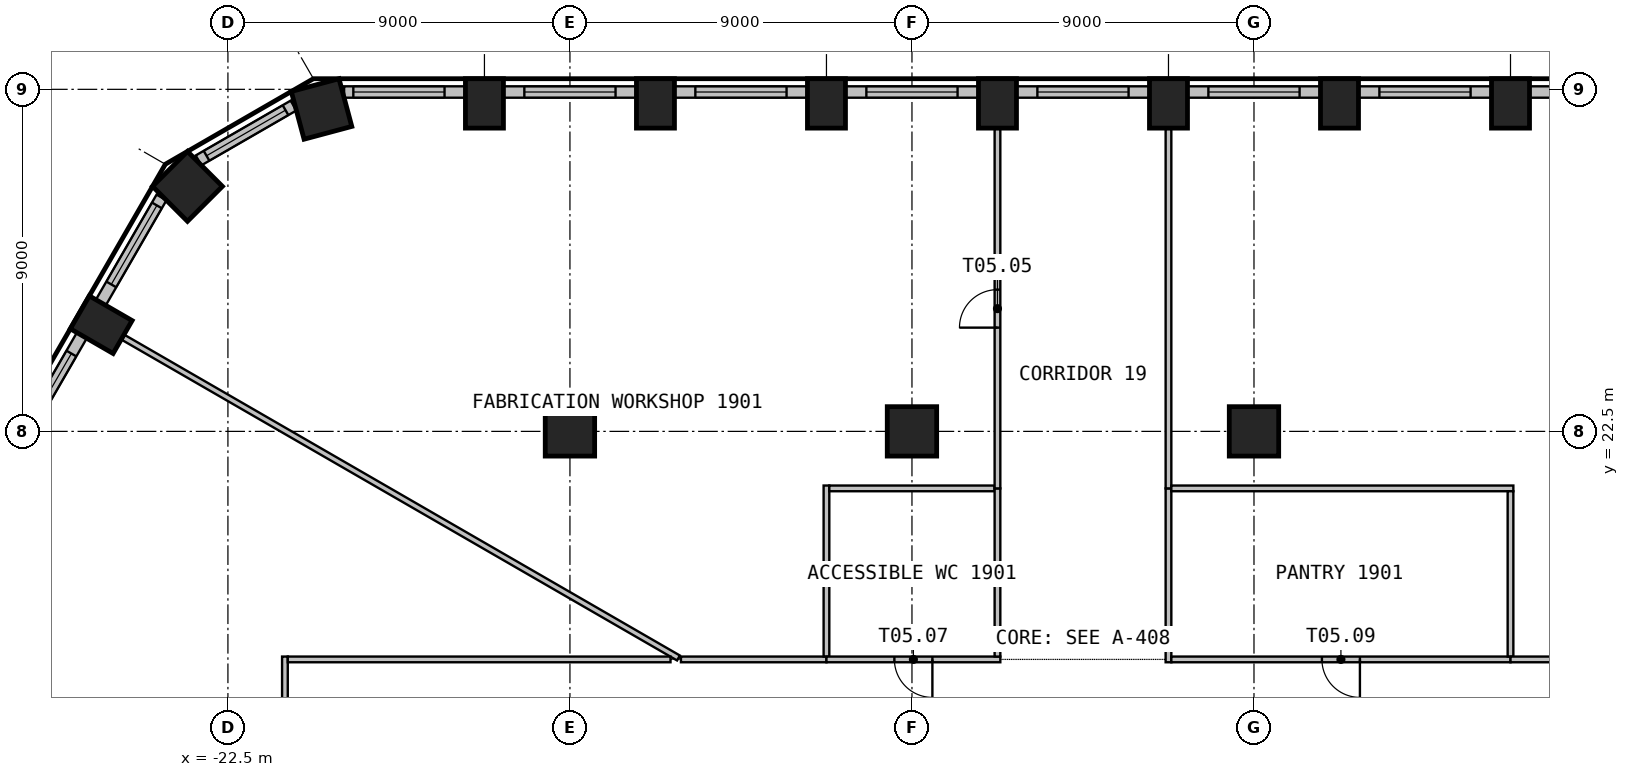
"""IFC4 building model, lengths in metres.
Left out: names, types, materials, properties, quantities, classifications, styles, units other than length and angle.
Written with IfcOpenShell. Run it as: python <this file> out.ifc"""

import sys

from ifc_helpers import new_model, si_unit, direction, frame, frame_2d, origin, origin_2d, place, context, subcontext, project, spatial, rectangle, circle, extrude, element, fill, save


model = new_model("IFC4")
c1 = context("Model", 3, precision=1e-05, world=origin(), true_north=direction((0.0, 1.0)))
c2 = subcontext(c1, "Body", "Model", "MODEL_VIEW")
j1 = project(units=[si_unit("LENGTHUNIT", "METRE"), si_unit("PLANEANGLEUNIT", "RADIAN")], contexts=[c1])
p1 = place(None, origin())
s1 = spatial("IfcSite", under=j1, at=p1, CompositionType="ELEMENT")
p2 = place(p1, origin())
s2 = spatial("IfcBuilding", under=s1, at=p2, CompositionType="ELEMENT")
p3 = place(p2, frame((0.0, 0.0, 81.3)))
s3 = spatial("IfcBuildingStorey", under=s2, at=p3, CompositionType="ELEMENT", Elevation=81.3)
for number, where, z_axis, x_axis in (
    (1, (11.25, 31.13, 0.0), (0.0, 0.0, 1.0), (-1.0, 0.0, 0.0)),
    (2, (6.75, 31.13, 0.0), (0.0, 0.0, 1.0), (-1.0, 0.0, 0.0)),
    (3, (2.25, 31.13, 0.0), (0.0, 0.0, 1.0), (-1.0, 0.0, 0.0)),
    (4, (-2.25, 31.13, 0.0), (0.0, 0.0, 1.0), (-1.0, 0.0, 0.0)),
    (5, (-6.75, 31.13, 0.0), (0.0, 0.0, 1.0), (-1.0, 0.0, 0.0)),
    (6, (-11.25, 31.13, 0.0), (0.0, 0.0, 1.0), (-1.0, 0.0, 0.0)),
    (7, (-15.75, 31.13, 0.0), (0.0, 0.0, 1.0), (-1.0, 0.0, 0.0)),
):
    element("IfcColumn", number, at=place(p3, frame(where, z_axis=z_axis, x_axis=x_axis)), inside=s3, PredefinedType="COLUMN", context=c2, shape_type="SweptSolid", body=[
        extrude(rectangle(XDim=1.0, YDim=1.3, at=origin_2d()), origin(), (0.0, 0.0, 1.0), 3.525),
    ])
for number, where, z_axis, x_axis in (
    (8, (-20.037, 30.984, 0.0), (0.0, 0.0, 1.0), (-0.966, -0.259, 0.0)),
    (9, (-23.564, 28.947, 0.0), (0.0, 0.0, 1.0), (-0.707, -0.707, 0.0)),
):
    element("IfcColumn", number, at=place(p3, frame(where, z_axis=z_axis, x_axis=x_axis)), inside=s3, PredefinedType="COLUMN", context=c2, shape_type="SweptSolid", body=[
        extrude(rectangle(XDim=1.3, YDim=1.3, at=origin_2d()), origin(), (0.0, 0.0, 1.0), 3.525),
    ])
p4 = place(p3, frame((-25.834, 25.308, 0.0), z_axis=(0.0, 0.0, 1.0), x_axis=(-0.5, -0.866025403784, 0.0)))
e10 = element("IfcColumn", 10, at=p4, inside=s3, PredefinedType="COLUMN", context=c2, shape_type="SweptSolid", body=[
    extrude(rectangle(XDim=1.0, YDim=1.3, at=origin_2d()), origin(), (0.0, 0.0, 1.0), 3.525),
])
for number, where, z_axis, x_axis in (
    (11, (-13.5, 22.5, 0.0), (0.0, 0.0, 1.0), (1.0, 0.0, 0.0)),
    (12, (-4.5, 22.5, 0.0), (0.0, 0.0, 1.0), (1.0, 0.0, 0.0)),
    (13, (4.5, 22.5, 0.0), (0.0, 0.0, 1.0), (1.0, 0.0, 0.0)),
):
    element("IfcColumn", number, at=place(p3, frame(where, z_axis=z_axis, x_axis=x_axis)), inside=s3, PredefinedType="COLUMN", context=c2, shape_type="SweptSolid", body=[
        extrude(circle(Radius=0.65, at=origin_2d()), origin(), (0.0, 0.0, 1.0), 3.525),
    ])
p5 = place(p3, frame((15.25, 31.43, 0.0), z_axis=(0.0, 0.0, 1.0), x_axis=(-1.0, 0.0, 0.0)))
e14 = element("IfcWall", 14, at=p5, inside=s3, PredefinedType="SOLIDWALL", context=c2, shape_type="SweptSolid", body=[
    extrude(rectangle(XDim=3.499, YDim=0.3, at=frame_2d((1.75, 0.0))), origin(), (0.0, 0.0, 1.0), 3.525),
])
p6 = place(p5, frame((0.55, 0.0, 0.9)))
e15 = element("IfcOpeningElement", 15, at=p6, cuts=e14, PredefinedType="OPENING", context=c2, shape_type="SweptSolid", body=[
    extrude(rectangle(XDim=2.4, YDim=2.1, at=frame_2d((1.2, 1.05))), frame((0.0, 0.16, 0.0), z_axis=(0.0, -1.0, 0.0), x_axis=(1.0, 0.0, 0.0)), (0.0, 0.0, 1.0), 0.32),
])
p7 = place(p3, frame((10.75, 31.43, 0.0), z_axis=(0.0, 0.0, 1.0), x_axis=(-1.0, 0.0, 0.0)))
e16 = element("IfcWall", 16, at=p7, inside=s3, PredefinedType="SOLIDWALL", context=c2, shape_type="SweptSolid", body=[
    extrude(rectangle(XDim=3.499, YDim=0.3, at=frame_2d((1.75, 0.0))), origin(), (0.0, 0.0, 1.0), 3.525),
])
p8 = place(p7, frame((0.55, 0.0, 0.9)))
e17 = element("IfcOpeningElement", 17, at=p8, cuts=e16, PredefinedType="OPENING", context=c2, shape_type="SweptSolid", body=[
    extrude(rectangle(XDim=2.4, YDim=2.1, at=frame_2d((1.2, 1.05))), frame((0.0, 0.16, 0.0), z_axis=(0.0, -1.0, 0.0), x_axis=(1.0, 0.0, 0.0)), (0.0, 0.0, 1.0), 0.32),
])
p9 = place(p3, frame((6.25, 31.43, 0.0), z_axis=(0.0, 0.0, 1.0), x_axis=(-1.0, 0.0, 0.0)))
e18 = element("IfcWall", 18, at=p9, inside=s3, PredefinedType="SOLIDWALL", context=c2, shape_type="SweptSolid", body=[
    extrude(rectangle(XDim=3.499, YDim=0.3, at=frame_2d((1.75, 0.0))), origin(), (0.0, 0.0, 1.0), 3.525),
])
p10 = place(p9, frame((0.55, 0.0, 0.9)))
e19 = element("IfcOpeningElement", 19, at=p10, cuts=e18, PredefinedType="OPENING", context=c2, shape_type="SweptSolid", body=[
    extrude(rectangle(XDim=2.4, YDim=2.1, at=frame_2d((1.2, 1.05))), frame((0.0, 0.16, 0.0), z_axis=(0.0, -1.0, 0.0), x_axis=(1.0, 0.0, 0.0)), (0.0, 0.0, 1.0), 0.32),
])
p11 = place(p3, frame((1.75, 31.43, 0.0), z_axis=(0.0, 0.0, 1.0), x_axis=(-1.0, 0.0, 0.0)))
e20 = element("IfcWall", 20, at=p11, inside=s3, PredefinedType="SOLIDWALL", context=c2, shape_type="SweptSolid", body=[
    extrude(rectangle(XDim=3.499, YDim=0.3, at=frame_2d((1.75, 0.0))), origin(), (0.0, 0.0, 1.0), 3.525),
])
p12 = place(p11, frame((0.55, 0.0, 0.9)))
e21 = element("IfcOpeningElement", 21, at=p12, cuts=e20, PredefinedType="OPENING", context=c2, shape_type="SweptSolid", body=[
    extrude(rectangle(XDim=2.4, YDim=2.1, at=frame_2d((1.2, 1.05))), frame((0.0, 0.16, 0.0), z_axis=(0.0, -1.0, 0.0), x_axis=(1.0, 0.0, 0.0)), (0.0, 0.0, 1.0), 0.32),
])
p13 = place(p3, frame((-2.75, 31.43, 0.0), z_axis=(0.0, 0.0, 1.0), x_axis=(-1.0, 0.0, 0.0)))
e22 = element("IfcWall", 22, at=p13, inside=s3, PredefinedType="SOLIDWALL", context=c2, shape_type="SweptSolid", body=[
    extrude(rectangle(XDim=3.499, YDim=0.3, at=frame_2d((1.75, 0.0))), origin(), (0.0, 0.0, 1.0), 3.525),
])
p14 = place(p13, frame((0.55, 0.0, 0.9)))
e23 = element("IfcOpeningElement", 23, at=p14, cuts=e22, PredefinedType="OPENING", context=c2, shape_type="SweptSolid", body=[
    extrude(rectangle(XDim=2.4, YDim=2.1, at=frame_2d((1.2, 1.05))), frame((0.0, 0.16, 0.0), z_axis=(0.0, -1.0, 0.0), x_axis=(1.0, 0.0, 0.0)), (0.0, 0.0, 1.0), 0.32),
])
p15 = place(p3, frame((-7.25, 31.43, 0.0), z_axis=(0.0, 0.0, 1.0), x_axis=(-1.0, 0.0, 0.0)))
e24 = element("IfcWall", 24, at=p15, inside=s3, PredefinedType="SOLIDWALL", context=c2, shape_type="SweptSolid", body=[
    extrude(rectangle(XDim=3.499, YDim=0.3, at=frame_2d((1.75, 0.0))), origin(), (0.0, 0.0, 1.0), 3.525),
])
p16 = place(p15, frame((0.55, 0.0, 0.9)))
e25 = element("IfcOpeningElement", 25, at=p16, cuts=e24, PredefinedType="OPENING", context=c2, shape_type="SweptSolid", body=[
    extrude(rectangle(XDim=2.4, YDim=2.1, at=frame_2d((1.2, 1.05))), frame((0.0, 0.16, 0.0), z_axis=(0.0, -1.0, 0.0), x_axis=(1.0, 0.0, 0.0)), (0.0, 0.0, 1.0), 0.32),
])
p17 = place(p3, frame((-11.75, 31.43, 0.0), z_axis=(0.0, 0.0, 1.0), x_axis=(-1.0, 0.0, 0.0)))
e26 = element("IfcWall", 26, at=p17, inside=s3, PredefinedType="SOLIDWALL", context=c2, shape_type="SweptSolid", body=[
    extrude(rectangle(XDim=3.499, YDim=0.3, at=frame_2d((1.75, 0.0))), origin(), (0.0, 0.0, 1.0), 3.525),
])
p18 = place(p17, frame((0.55, 0.0, 0.9)))
e27 = element("IfcOpeningElement", 27, at=p18, cuts=e26, PredefinedType="OPENING", context=c2, shape_type="SweptSolid", body=[
    extrude(rectangle(XDim=2.4, YDim=2.1, at=frame_2d((1.2, 1.05))), frame((0.0, 0.16, 0.0), z_axis=(0.0, -1.0, 0.0), x_axis=(1.0, 0.0, 0.0)), (0.0, 0.0, 1.0), 0.32),
])
p19 = place(p3, frame((-16.25, 31.43, 0.0), z_axis=(0.0, 0.0, 1.0), x_axis=(-1.0, 0.0, 0.0)))
e28 = element("IfcWall", 28, at=p19, inside=s3, PredefinedType="SOLIDWALL", context=c2, shape_type="SweptSolid", body=[
    extrude(rectangle(XDim=3.192, YDim=0.3, at=frame_2d((1.596, 0.0))), origin(), (0.0, 0.0, 1.0), 3.525),
])
p20 = place(p19, frame((0.55, 0.0, 0.9)))
e29 = element("IfcOpeningElement", 29, at=p20, cuts=e28, PredefinedType="OPENING", context=c2, shape_type="SweptSolid", body=[
    extrude(rectangle(XDim=2.4, YDim=2.1, at=frame_2d((1.2, 1.05))), frame((0.0, 0.16, 0.0), z_axis=(0.0, -1.0, 0.0), x_axis=(1.0, 0.0, 0.0)), (0.0, 0.0, 1.0), 0.32),
])
p21 = place(p3, frame((-20.774, 31.073, 0.0), z_axis=(0.0, 0.0, 1.0), x_axis=(-0.866053149362, -0.49995194017, 0.0)))
e30 = element("IfcWall", 30, at=p21, inside=s3, PredefinedType="SOLIDWALL", context=c2, shape_type="SweptSolid", body=[
    extrude(rectangle(XDim=2.885, YDim=0.3, at=frame_2d((1.443, 0.0))), origin(), (0.0, 0.0, 1.0), 3.525),
])
p22 = place(p21, frame((0.243, 0.0, 0.9)))
e31 = element("IfcOpeningElement", 31, at=p22, cuts=e30, PredefinedType="OPENING", context=c2, shape_type="SweptSolid", body=[
    extrude(rectangle(XDim=2.4, YDim=2.1, at=frame_2d((1.2, 1.05))), frame((0.0, 0.16, 0.0), z_axis=(0.0, -1.0, 0.0), x_axis=(1.0, 0.0, 0.0)), (0.0, 0.0, 1.0), 0.32),
])
p23 = place(p3, frame((-24.248, 28.656, 0.0), z_axis=(0.0, 0.0, 1.0), x_axis=(-0.500004907028, -0.866022570692, 0.0)))
e32 = element("IfcWall", 32, at=p23, inside=s3, PredefinedType="SOLIDWALL", context=c2, shape_type="SweptSolid", body=[
    extrude(rectangle(XDim=3.192, YDim=0.3, at=frame_2d((1.596, 0.0))), origin(), (0.0, 0.0, 1.0), 3.525),
])
p24 = place(p23, frame((0.243, 0.0, 0.9)))
e33 = element("IfcOpeningElement", 33, at=p24, cuts=e32, PredefinedType="OPENING", context=c2, shape_type="SweptSolid", body=[
    extrude(rectangle(XDim=2.4, YDim=2.1, at=frame_2d((1.2, 1.05))), frame((0.0, 0.16, 0.0), z_axis=(0.0, -1.0, 0.0), x_axis=(1.0, 0.0, 0.0)), (0.0, 0.0, 1.0), 0.32),
])
p25 = place(p3, frame((-26.344, 25.024, 0.0), z_axis=(0.0, 0.0, 1.0), x_axis=(-0.499996256241, -0.866027565234, 0.0)))
e34 = element("IfcWall", 34, at=p25, inside=s3, PredefinedType="SOLIDWALL", context=c2, shape_type="SweptSolid", body=[
    extrude(rectangle(XDim=3.499, YDim=0.3, at=frame_2d((1.75, 0.0))), origin(), (0.0, 0.0, 1.0), 3.525),
])
p26 = place(p25, frame((0.55, 0.0, 0.9)))
e35 = element("IfcOpeningElement", 35, at=p26, cuts=e34, PredefinedType="OPENING", context=c2, shape_type="SweptSolid", body=[
    extrude(rectangle(XDim=2.4, YDim=2.1, at=frame_2d((1.2, 1.05))), frame((0.0, 0.16, 0.0), z_axis=(0.0, -1.0, 0.0), x_axis=(1.0, 0.0, 0.0)), (0.0, 0.0, 1.0), 0.32),
])
p27 = place(p3, frame((-25.254, 24.973, 0.0), z_axis=(0.0, 0.0, 1.0), x_axis=(0.866017851419, -0.500013080853, 0.0)))
e36 = element("IfcWall", 36, at=p27, inside=s3, PredefinedType="PARTITIONING", context=c2, shape_type="SweptSolid", body=[
    extrude(rectangle(XDim=16.87, YDim=0.15, at=frame_2d((8.435, 0.0))), origin(), (0.0, 0.0, 1.0), 3.525),
])
p28 = place(p3, frame((-21.0, 16.575, 0.0), z_axis=(0.0, 0.0, 1.0), x_axis=(0.0, -1.0, 0.0)))
e37 = element("IfcWall", 37, at=p28, inside=s3, PredefinedType="PARTITIONING", context=c2, shape_type="SweptSolid", body=[
    extrude(rectangle(XDim=13.762, YDim=0.15, at=frame_2d((6.881, 0.0))), origin(), (0.0, 0.0, 1.0), 3.525),
])
p29 = place(p28, frame((6.381, 0.0, 0.0)))
e38 = element("IfcOpeningElement", 38, at=p29, cuts=e37, PredefinedType="OPENING", context=c2, shape_type="SweptSolid", body=[
    extrude(rectangle(XDim=1.0, YDim=2.1, at=frame_2d((0.5, 1.05))), frame((0.0, 0.085, 0.0), z_axis=(0.0, -1.0, 0.0), x_axis=(1.0, 0.0, 0.0)), (0.0, 0.0, 1.0), 0.17),
])
p30 = place(p3, frame((-10.854, 16.5, 0.0), z_axis=(0.0, 0.0, 1.0), x_axis=(-1.0, 0.0, 0.0)))
e39 = element("IfcWall", 39, at=p30, inside=s3, PredefinedType="PARTITIONING", context=c2, shape_type="SweptSolid", body=[
    extrude(rectangle(XDim=10.071, YDim=0.15, at=frame_2d((5.036, 0.0))), origin(), (0.0, 0.0, 1.0), 3.525),
])
p31 = place(p3, frame((-6.75, 16.5, 0.0), z_axis=(0.0, 0.0, 1.0), x_axis=(-1.0, 0.0, 0.0)))
e40 = element("IfcWall", 40, at=p31, inside=s3, PredefinedType="PARTITIONING", context=c2, shape_type="SweptSolid", body=[
    extrude(rectangle(XDim=3.829, YDim=0.15, at=frame_2d((1.915, 0.0))), origin(), (0.0, 0.0, 1.0), 3.525),
])
p32 = place(p3, frame((-6.75, 21.075, 0.0), z_axis=(0.0, 0.0, 1.0), x_axis=(0.0, -1.0, 0.0)))
e41 = element("IfcWall", 41, at=p32, inside=s3, PredefinedType="PARTITIONING", context=c2, shape_type="SweptSolid", body=[
    extrude(rectangle(XDim=4.5, YDim=0.15, at=frame_2d((2.25, 0.0))), origin(), (0.0, 0.0, 1.0), 3.525),
])
p33 = place(p3, frame((-2.175, 16.5, 0.0), z_axis=(0.0, 0.0, 1.0), x_axis=(-1.0, 0.0, 0.0)))
e42 = element("IfcWall", 42, at=p33, inside=s3, PredefinedType="PARTITIONING", context=c2, shape_type="SweptSolid", body=[
    extrude(rectangle(XDim=4.575, YDim=0.15, at=frame_2d((2.288, 0.0))), origin(), (0.0, 0.0, 1.0), 3.525),
])
p34 = place(p33, frame((1.788, 0.0, 0.0)))
e43 = element("IfcOpeningElement", 43, at=p34, cuts=e42, PredefinedType="OPENING", context=c2, shape_type="SweptSolid", body=[
    extrude(rectangle(XDim=1.0, YDim=2.1, at=frame_2d((0.5, 1.05))), frame((0.0, 0.085, 0.0), z_axis=(0.0, -1.0, 0.0), x_axis=(1.0, 0.0, 0.0)), (0.0, 0.0, 1.0), 0.17),
])
p35 = place(p3, frame((-2.325, 21.0, 0.0), z_axis=(0.0, 0.0, 1.0), x_axis=(-1.0, 0.0, 0.0)))
e44 = element("IfcWall", 44, at=p35, inside=s3, PredefinedType="PARTITIONING", context=c2, shape_type="SweptSolid", body=[
    extrude(rectangle(XDim=4.35, YDim=0.15, at=frame_2d((2.175, 0.0))), origin(), (0.0, 0.0, 1.0), 3.525),
])
p36 = place(p3, frame((-2.25, 16.575, 0.0), z_axis=(0.0, 0.0, 1.0), x_axis=(0.0, 1.0, 0.0)))
e45 = element("IfcWall", 45, at=p36, inside=s3, PredefinedType="PARTITIONING", context=c2, shape_type="SweptSolid", body=[
    extrude(rectangle(XDim=4.425, YDim=0.15, at=frame_2d((2.212, 0.0))), origin(), (0.0, 0.0, 1.0), 3.525),
])
p37 = place(p3, frame((-2.25, 21.0, 0.0), z_axis=(0.0, 0.0, 1.0), x_axis=(0.0, 1.0, 0.0)))
e46 = element("IfcWall", 46, at=p37, inside=s3, PredefinedType="PARTITIONING", context=c2, shape_type="SweptSolid", body=[
    extrude(rectangle(XDim=9.46, YDim=0.15, at=frame_2d((4.73, 0.0))), origin(), (0.0, 0.0, 1.0), 3.525),
])
p38 = place(p37, frame((4.23, 0.0, 0.0)))
e47 = element("IfcOpeningElement", 47, at=p38, cuts=e46, PredefinedType="OPENING", context=c2, shape_type="SweptSolid", body=[
    extrude(rectangle(XDim=1.0, YDim=2.1, at=frame_2d((0.5, 1.05))), frame((0.0, 0.085, 0.0), z_axis=(0.0, -1.0, 0.0), x_axis=(1.0, 0.0, 0.0)), (0.0, 0.0, 1.0), 0.17),
])
p39 = place(p3, frame((2.25, 21.0, 0.0), z_axis=(0.0, 0.0, 1.0), x_axis=(0.0, -1.0, 0.0)))
e48 = element("IfcWall", 48, at=p39, inside=s3, PredefinedType="PARTITIONING", context=c2, shape_type="SweptSolid", body=[
    extrude(rectangle(XDim=4.575, YDim=0.15, at=frame_2d((2.288, 0.0))), origin(), (0.0, 0.0, 1.0), 3.525),
])
p40 = place(p3, frame((11.25, 16.5, 0.0), z_axis=(0.0, 0.0, 1.0), x_axis=(-1.0, 0.0, 0.0)))
e49 = element("IfcWall", 49, at=p40, inside=s3, PredefinedType="PARTITIONING", context=c2, shape_type="SweptSolid", body=[
    extrude(rectangle(XDim=8.925, YDim=0.15, at=frame_2d((4.462, 0.0))), origin(), (0.0, 0.0, 1.0), 3.525),
])
p41 = place(p40, frame((3.962, 0.0, 0.0)))
e50 = element("IfcOpeningElement", 50, at=p41, cuts=e49, PredefinedType="OPENING", context=c2, shape_type="SweptSolid", body=[
    extrude(rectangle(XDim=1.0, YDim=2.1, at=frame_2d((0.5, 1.05))), frame((0.0, 0.085, 0.0), z_axis=(0.0, -1.0, 0.0), x_axis=(1.0, 0.0, 0.0)), (0.0, 0.0, 1.0), 0.17),
])
p42 = place(p3, frame((2.25, 30.46, 0.0), z_axis=(0.0, 0.0, 1.0), x_axis=(0.0, -1.0, 0.0)))
e51 = element("IfcWall", 51, at=p42, inside=s3, PredefinedType="PARTITIONING", context=c2, shape_type="SweptSolid", body=[
    extrude(rectangle(XDim=9.46, YDim=0.15, at=frame_2d((4.73, 0.0))), origin(), (0.0, 0.0, 1.0), 3.525),
])
p43 = place(p3, frame((2.325, 21.0, 0.0), z_axis=(0.0, 0.0, 1.0), x_axis=(1.0, 0.0, 0.0)))
e52 = element("IfcWall", 52, at=p43, inside=s3, PredefinedType="PARTITIONING", context=c2, shape_type="SweptSolid", body=[
    extrude(rectangle(XDim=9.0, YDim=0.15, at=frame_2d((4.5, 0.0))), origin(), (0.0, 0.0, 1.0), 3.525),
])
p44 = place(p3, frame((11.25, 20.925, 0.0), z_axis=(0.0, 0.0, 1.0), x_axis=(0.0, -1.0, 0.0)))
e53 = element("IfcWall", 53, at=p44, inside=s3, PredefinedType="PARTITIONING", context=c2, shape_type="SweptSolid", body=[
    extrude(rectangle(XDim=4.35, YDim=0.15, at=frame_2d((2.175, 0.0))), origin(), (0.0, 0.0, 1.0), 3.525),
])
p45 = place(p3, frame((21.075, 16.5, 0.0), z_axis=(0.0, 0.0, 1.0), x_axis=(-1.0, 0.0, 0.0)))
e54 = element("IfcWall", 54, at=p45, inside=s3, PredefinedType="PARTITIONING", context=c2, shape_type="SweptSolid", body=[
    extrude(rectangle(XDim=9.825, YDim=0.15, at=frame_2d((4.913, 0.0))), origin(), (0.0, 0.0, 1.0), 3.525),
])
p46 = place(p8, origin())
e55 = element("IfcWindow", 55, at=p46, inside=s3, PartitioningType="SINGLE_PANEL", PredefinedType="WINDOW", context=c2, shape_type="SweptSolid", body=[
    extrude(rectangle(XDim=2.4, YDim=2.1, at=frame_2d((1.2, 1.05))), frame((0.0, 0.03, 0.0), z_axis=(0.0, -1.0, 0.0), x_axis=(1.0, 0.0, 0.0)), (0.0, 0.0, 1.0), 0.06),
])
fill(e17, e55)
p47 = place(p10, origin())
e56 = element("IfcWindow", 56, at=p47, inside=s3, PartitioningType="SINGLE_PANEL", PredefinedType="WINDOW", context=c2, shape_type="SweptSolid", body=[
    extrude(rectangle(XDim=2.4, YDim=2.1, at=frame_2d((1.2, 1.05))), frame((0.0, 0.03, 0.0), z_axis=(0.0, -1.0, 0.0), x_axis=(1.0, 0.0, 0.0)), (0.0, 0.0, 1.0), 0.06),
])
fill(e19, e56)
p48 = place(p12, origin())
e57 = element("IfcWindow", 57, at=p48, inside=s3, PartitioningType="SINGLE_PANEL", PredefinedType="WINDOW", context=c2, shape_type="SweptSolid", body=[
    extrude(rectangle(XDim=2.4, YDim=2.1, at=frame_2d((1.2, 1.05))), frame((0.0, 0.03, 0.0), z_axis=(0.0, -1.0, 0.0), x_axis=(1.0, 0.0, 0.0)), (0.0, 0.0, 1.0), 0.06),
])
fill(e21, e57)
p49 = place(p14, origin())
e58 = element("IfcWindow", 58, at=p49, inside=s3, PartitioningType="SINGLE_PANEL", PredefinedType="WINDOW", context=c2, shape_type="SweptSolid", body=[
    extrude(rectangle(XDim=2.4, YDim=2.1, at=frame_2d((1.2, 1.05))), frame((0.0, 0.03, 0.0), z_axis=(0.0, -1.0, 0.0), x_axis=(1.0, 0.0, 0.0)), (0.0, 0.0, 1.0), 0.06),
])
fill(e23, e58)
p50 = place(p16, origin())
e59 = element("IfcWindow", 59, at=p50, inside=s3, PartitioningType="SINGLE_PANEL", PredefinedType="WINDOW", context=c2, shape_type="SweptSolid", body=[
    extrude(rectangle(XDim=2.4, YDim=2.1, at=frame_2d((1.2, 1.05))), frame((0.0, 0.03, 0.0), z_axis=(0.0, -1.0, 0.0), x_axis=(1.0, 0.0, 0.0)), (0.0, 0.0, 1.0), 0.06),
])
fill(e25, e59)
p51 = place(p18, origin())
e60 = element("IfcWindow", 60, at=p51, inside=s3, PartitioningType="SINGLE_PANEL", PredefinedType="WINDOW", context=c2, shape_type="SweptSolid", body=[
    extrude(rectangle(XDim=2.4, YDim=2.1, at=frame_2d((1.2, 1.05))), frame((0.0, 0.03, 0.0), z_axis=(0.0, -1.0, 0.0), x_axis=(1.0, 0.0, 0.0)), (0.0, 0.0, 1.0), 0.06),
])
fill(e27, e60)
p52 = place(p20, origin())
e61 = element("IfcWindow", 61, at=p52, inside=s3, PartitioningType="SINGLE_PANEL", PredefinedType="WINDOW", context=c2, shape_type="SweptSolid", body=[
    extrude(rectangle(XDim=2.4, YDim=2.1, at=frame_2d((1.2, 1.05))), frame((0.0, 0.03, 0.0), z_axis=(0.0, -1.0, 0.0), x_axis=(1.0, 0.0, 0.0)), (0.0, 0.0, 1.0), 0.06),
])
fill(e29, e61)
p53 = place(p22, origin())
e62 = element("IfcWindow", 62, at=p53, inside=s3, PartitioningType="SINGLE_PANEL", PredefinedType="WINDOW", context=c2, shape_type="SweptSolid", body=[
    extrude(rectangle(XDim=2.4, YDim=2.1, at=frame_2d((1.2, 1.05))), frame((0.0, 0.03, 0.0), z_axis=(0.0, -1.0, 0.0), x_axis=(1.0, 0.0, 0.0)), (0.0, 0.0, 1.0), 0.06),
])
fill(e31, e62)
p54 = place(p24, origin())
e63 = element("IfcWindow", 63, at=p54, inside=s3, PartitioningType="SINGLE_PANEL", PredefinedType="WINDOW", context=c2, shape_type="SweptSolid", body=[
    extrude(rectangle(XDim=2.4, YDim=2.1, at=frame_2d((1.2, 1.05))), frame((0.0, 0.03, 0.0), z_axis=(0.0, -1.0, 0.0), x_axis=(1.0, 0.0, 0.0)), (0.0, 0.0, 1.0), 0.06),
])
fill(e33, e63)
p55 = place(p26, origin())
e64 = element("IfcWindow", 64, at=p55, inside=s3, PartitioningType="SINGLE_PANEL", PredefinedType="WINDOW", context=c2, shape_type="SweptSolid", body=[
    extrude(rectangle(XDim=2.4, YDim=2.1, at=frame_2d((1.2, 1.05))), frame((0.0, 0.03, 0.0), z_axis=(0.0, -1.0, 0.0), x_axis=(1.0, 0.0, 0.0)), (0.0, 0.0, 1.0), 0.06),
])
fill(e35, e64)
p56 = place(p38, origin())
e65 = element("IfcDoor", 65, at=p56, inside=s3, OperationType="SINGLE_SWING_LEFT", PredefinedType="DOOR", context=c2, shape_type="SweptSolid", body=[
    extrude(rectangle(XDim=1.0, YDim=2.1, at=frame_2d((0.5, 1.05))), frame((0.0, 0.025, 0.0), z_axis=(0.0, -1.0, 0.0), x_axis=(1.0, 0.0, 0.0)), (0.0, 0.0, 1.0), 0.05),
])
fill(e47, e65)
p57 = place(p34, origin())
e66 = element("IfcDoor", 66, at=p57, inside=s3, OperationType="SINGLE_SWING_RIGHT", PredefinedType="DOOR", context=c2, shape_type="SweptSolid", body=[
    extrude(rectangle(XDim=1.0, YDim=2.1, at=frame_2d((0.5, 1.05))), frame((0.0, 0.025, 0.0), z_axis=(0.0, -1.0, 0.0), x_axis=(1.0, 0.0, 0.0)), (0.0, 0.0, 1.0), 0.05),
])
fill(e43, e66)
p58 = place(p41, origin())
e67 = element("IfcDoor", 67, at=p58, inside=s3, OperationType="SINGLE_SWING_RIGHT", PredefinedType="DOOR", context=c2, shape_type="SweptSolid", body=[
    extrude(rectangle(XDim=1.0, YDim=2.1, at=frame_2d((0.5, 1.05))), frame((0.0, 0.025, 0.0), z_axis=(0.0, -1.0, 0.0), x_axis=(1.0, 0.0, 0.0)), (0.0, 0.0, 1.0), 0.05),
])
fill(e50, e67)
save(model, sys.argv[1])
